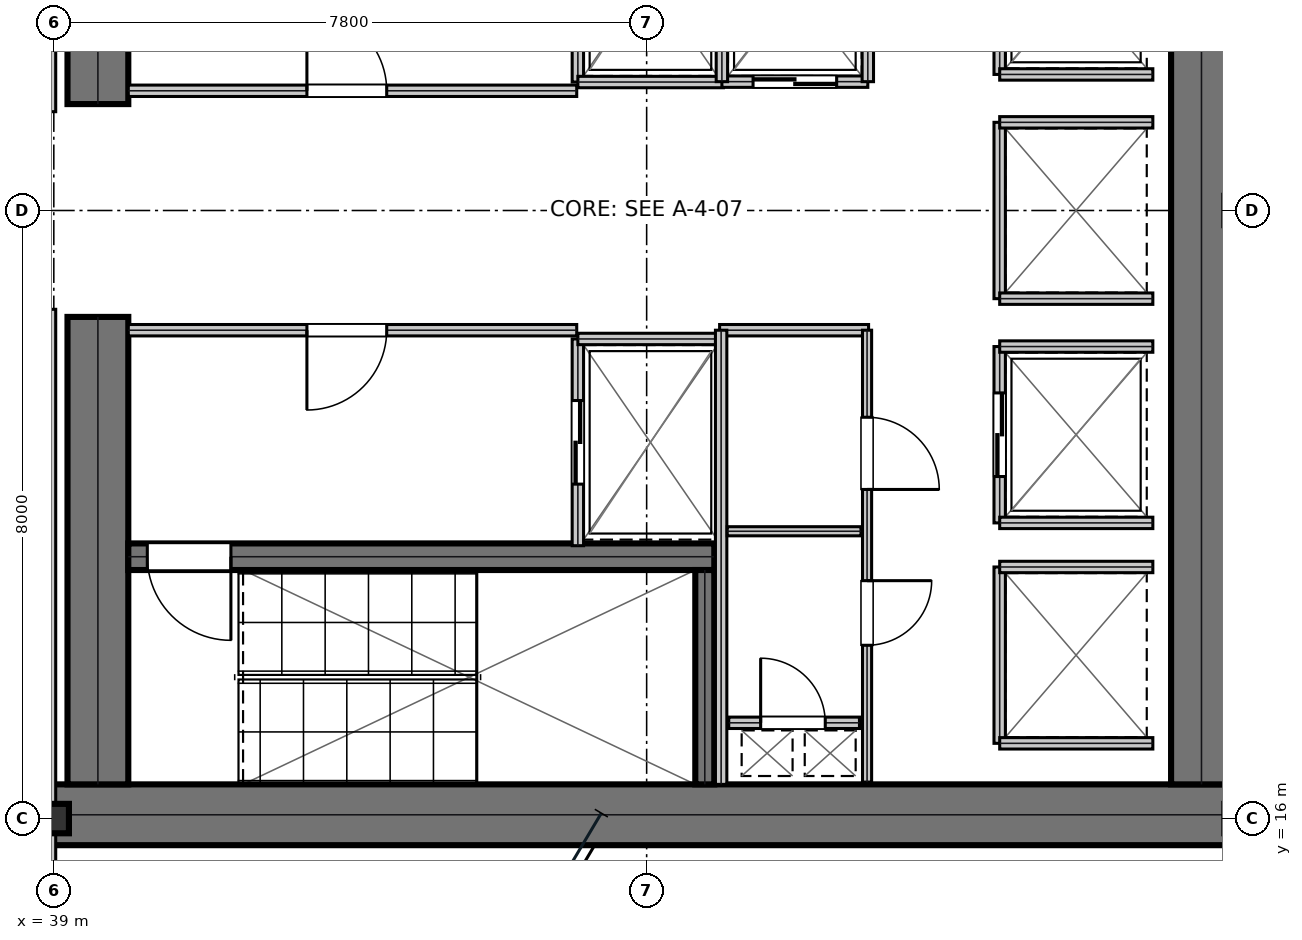
"""IFC4 building model, lengths in metres.
Left out: names, types, materials, properties, quantities, classifications, styles, units other than length and angle.
Written with IfcOpenShell. Run it as: python <this file> out.ifc"""

import sys

from ifc_helpers import new_model, si_unit, direction, frame, frame_2d, origin, origin_2d, place, context, subcontext, project, spatial, rectangle, i_section, extrude, element, fill, save


model = new_model("IFC4")
c1 = context("Model", 3, precision=1e-05, world=origin(), true_north=direction((0.0, 1.0)))
c2 = subcontext(c1, "Body", "Model", "MODEL_VIEW")
j1 = project(units=[si_unit("LENGTHUNIT", "METRE"), si_unit("PLANEANGLEUNIT", "RADIAN")], contexts=[c1])
p1 = place(None, origin())
s1 = spatial("IfcSite", under=j1, at=p1, CompositionType="ELEMENT")
p2 = place(p1, origin())
s2 = spatial("IfcBuilding", under=s1, at=p2, CompositionType="ELEMENT")
p3 = place(p2, frame((0.0, 0.0, 177.6)))
s3 = spatial("IfcBuildingStorey", under=s2, at=p3, CompositionType="ELEMENT", Elevation=177.6)
p4 = place(p3, frame((38.8, 16.05, 0.0), z_axis=(0.0, 0.0, 1.0), x_axis=(1.0, 0.0, 0.0)))
e1 = element("IfcWall", 1, at=p4, inside=s3, PredefinedType="SHEAR", context=c2, shape_type="SweptSolid", body=[
    extrude(rectangle(XDim=16.0, YDim=0.8, at=frame_2d((8.0, 0.0))), origin(), (0.0, 0.0, 1.0), 3.73),
])
for number, where, z_axis, x_axis in (
    (2, (39.58, 16.45, 0.0), (0.0, 0.0, 1.0), (0.0, 1.0, 0.0)),
    (3, (39.58, 25.4, 0.0), (0.0, 0.0, 1.0), (0.0, 1.0, 0.0)),
):
    element("IfcWall", number, at=place(p3, frame(where, z_axis=z_axis, x_axis=x_axis)), inside=s3, PredefinedType="SHEAR", context=c2, shape_type="SweptSolid", body=[
        extrude(rectangle(XDim=6.15, YDim=0.8, at=frame_2d((3.075, 0.0))), origin(), (0.0, 0.0, 1.0), 3.73),
    ])
p5 = place(p3, frame((54.1, 16.45, 0.0), z_axis=(0.0, 0.0, 1.0), x_axis=(0.0, 1.0, 0.0)))
e4 = element("IfcWall", 4, at=p5, inside=s3, PredefinedType="SHEAR", context=c2, shape_type="SweptSolid", body=[
    extrude(rectangle(XDim=15.1, YDim=0.8, at=frame_2d((7.55, 0.0))), origin(), (0.0, 0.0, 1.0), 3.73),
])
p6 = place(p3, frame((39.98, 19.445, 0.0), z_axis=(0.0, 0.0, 1.0), x_axis=(1.0, 0.0, 0.0)))
e5 = element("IfcWall", 5, at=p6, inside=s3, PredefinedType="SHEAR", context=c2, shape_type="SweptSolid", body=[
    extrude(rectangle(XDim=7.71, YDim=0.35, at=frame_2d((3.855, 0.0))), origin(), (0.0, 0.0, 1.0), 3.73),
])
p7 = place(p6, frame((0.25, 0.0, 0.0)))
e6 = element("IfcOpeningElement", 6, at=p7, cuts=e5, PredefinedType="OPENING", context=c2, shape_type="SweptSolid", body=[
    extrude(rectangle(XDim=1.1, YDim=2.15, at=frame_2d((0.55, 1.075))), frame((0.0, 0.185, 0.0), z_axis=(0.0, -1.0, 0.0), x_axis=(1.0, 0.0, 0.0)), (0.0, 0.0, 1.0), 0.37),
])
p8 = place(p3, frame((47.565, 16.45, 0.0), z_axis=(0.0, 0.0, 1.0), x_axis=(0.0, 1.0, 0.0)))
e7 = element("IfcWall", 7, at=p8, inside=s3, PredefinedType="SHEAR", context=c2, shape_type="SweptSolid", body=[
    extrude(rectangle(XDim=2.82, YDim=0.25, at=frame_2d((1.41, 0.0))), origin(), (0.0, 0.0, 1.0), 3.73),
])
p9 = place(p3, frame((39.0, 16.0, 0.0), z_axis=(0.0, 0.0, 1.0), x_axis=(1.0, 0.0, 0.0)))
e8 = element("IfcColumn", 8, at=p9, inside=s3, PredefinedType="COLUMN", context=c2, shape_type="SweptSolid", body=[
    extrude(i_section(OverallWidth=0.398, OverallDepth=0.387, WebThickness=0.021, FlangeThickness=0.033, at=origin_2d()), origin(), (0.0, 0.0, 1.0), 4.044),
])
p10 = place(p3, frame((39.98, 25.575, 0.0), z_axis=(0.0, 0.0, 1.0), x_axis=(1.0, 0.0, 0.0)))
e9 = element("IfcWall", 9, at=p10, inside=s3, PredefinedType="PARTITIONING", context=c2, shape_type="SweptSolid", body=[
    extrude(rectangle(XDim=5.9, YDim=0.15, at=frame_2d((2.95, 0.0))), origin(), (0.0, 0.0, 1.0), 3.73),
])
p11 = place(p10, frame((2.35, 0.0, 0.0)))
e10 = element("IfcOpeningElement", 10, at=p11, cuts=e9, PredefinedType="OPENING", context=c2, shape_type="SweptSolid", body=[
    extrude(rectangle(XDim=1.05, YDim=2.15, at=frame_2d((0.525, 1.075))), frame((0.0, 0.085, 0.0), z_axis=(0.0, -1.0, 0.0), x_axis=(1.0, 0.0, 0.0)), (0.0, 0.0, 1.0), 0.17),
])
p12 = place(p3, frame((39.98, 22.425, 0.0), z_axis=(0.0, 0.0, 1.0), x_axis=(1.0, 0.0, 0.0)))
e11 = element("IfcWall", 11, at=p12, inside=s3, PredefinedType="PARTITIONING", context=c2, shape_type="SweptSolid", body=[
    extrude(rectangle(XDim=5.9, YDim=0.15, at=frame_2d((2.95, 0.0))), origin(), (0.0, 0.0, 1.0), 3.73),
])
p13 = place(p12, frame((2.35, 0.0, 0.0)))
e12 = element("IfcOpeningElement", 12, at=p13, cuts=e11, PredefinedType="OPENING", context=c2, shape_type="SweptSolid", body=[
    extrude(rectangle(XDim=1.05, YDim=2.15, at=frame_2d((0.525, 1.075))), frame((0.0, 0.085, 0.0), z_axis=(0.0, -1.0, 0.0), x_axis=(1.0, 0.0, 0.0)), (0.0, 0.0, 1.0), 0.17),
])
p14 = place(p3, frame((45.895, 25.69, 0.0), z_axis=(0.0, 0.0, 1.0), x_axis=(0.0, 1.0, 0.0)))
e13 = element("IfcWall", 13, at=p14, inside=s3, PredefinedType="PARTITIONING", context=c2, shape_type="SweptSolid", body=[
    extrude(rectangle(XDim=2.72, YDim=0.15, at=frame_2d((1.36, 0.0))), origin(), (0.0, 0.0, 1.0), 3.73),
])
p15 = place(p14, frame((0.81, 0.0, 0.0)))
e14 = element("IfcOpeningElement", 14, at=p15, cuts=e13, PredefinedType="OPENING", context=c2, shape_type="SweptSolid", body=[
    extrude(rectangle(XDim=1.1, YDim=2.15, at=frame_2d((0.55, 1.075))), frame((0.0, 0.085, 0.0), z_axis=(0.0, -1.0, 0.0), x_axis=(1.0, 0.0, 0.0)), (0.0, 0.0, 1.0), 0.17),
])
p16 = place(p3, frame((45.895, 25.69, 0.0), z_axis=(0.0, 0.0, 1.0), x_axis=(1.0, 0.0, 0.0)))
e15 = element("IfcWall", 15, at=p16, inside=s3, PredefinedType="PARTITIONING", context=c2, shape_type="SweptSolid", body=[
    extrude(rectangle(XDim=1.915, YDim=0.15, at=frame_2d((0.958, 0.0))), origin(), (0.0, 0.0, 1.0), 3.73),
])
p17 = place(p3, frame((45.895, 19.59, 0.0), z_axis=(0.0, 0.0, 1.0), x_axis=(0.0, 1.0, 0.0)))
e16 = element("IfcWall", 16, at=p17, inside=s3, PredefinedType="PARTITIONING", context=c2, shape_type="SweptSolid", body=[
    extrude(rectangle(XDim=2.72, YDim=0.15, at=frame_2d((1.36, 0.0))), origin(), (0.0, 0.0, 1.0), 3.73),
])
p18 = place(p17, frame((0.81, 0.0, 0.0)))
e17 = element("IfcOpeningElement", 17, at=p18, cuts=e16, PredefinedType="OPENING", context=c2, shape_type="SweptSolid", body=[
    extrude(rectangle(XDim=1.1, YDim=2.15, at=frame_2d((0.55, 1.075))), frame((0.0, 0.085, 0.0), z_axis=(0.0, -1.0, 0.0), x_axis=(1.0, 0.0, 0.0)), (0.0, 0.0, 1.0), 0.17),
])
p19 = place(p3, frame((45.895, 22.31, 0.0), z_axis=(0.0, 0.0, 1.0), x_axis=(1.0, 0.0, 0.0)))
e18 = element("IfcWall", 18, at=p19, inside=s3, PredefinedType="PARTITIONING", context=c2, shape_type="SweptSolid", body=[
    extrude(rectangle(XDim=1.915, YDim=0.15, at=frame_2d((0.958, 0.0))), origin(), (0.0, 0.0, 1.0), 3.73),
])
p20 = place(p3, frame((47.79, 25.695, 0.0), z_axis=(0.0, 0.0, 1.0), x_axis=(1.0, 0.0, 0.0)))
e19 = element("IfcWall", 19, at=p20, inside=s3, PredefinedType="PARTITIONING", context=c2, shape_type="SweptSolid", body=[
    extrude(rectangle(XDim=1.92, YDim=0.15, at=frame_2d((0.96, 0.0))), origin(), (0.0, 0.0, 1.0), 3.73),
])
p21 = place(p20, frame((0.41, 0.0, 0.0)))
e20 = element("IfcOpeningElement", 20, at=p21, cuts=e19, PredefinedType="OPENING", context=c2, shape_type="SweptSolid", body=[
    extrude(rectangle(XDim=1.1, YDim=2.15, at=frame_2d((0.55, 1.075))), frame((0.0, 0.085, 0.0), z_axis=(0.0, -1.0, 0.0), x_axis=(1.0, 0.0, 0.0)), (0.0, 0.0, 1.0), 0.17),
])
for number, where, z_axis, x_axis in (
    (21, (47.79, 25.695, 0.0), (0.0, 0.0, 1.0), (0.0, 1.0, 0.0)),
    (22, (49.71, 25.695, 0.0), (0.0, 0.0, 1.0), (0.0, 1.0, 0.0)),
):
    element("IfcWall", number, at=place(p3, frame(where, z_axis=z_axis, x_axis=x_axis)), inside=s3, PredefinedType="PARTITIONING", context=c2, shape_type="SweptSolid", body=[
        extrude(rectangle(XDim=2.415, YDim=0.15, at=frame_2d((1.208, 0.0))), origin(), (0.0, 0.0, 1.0), 3.73),
    ])
p22 = place(p3, frame((51.445, 25.79, 0.0), z_axis=(0.0, 0.0, 1.0), x_axis=(0.0, 1.0, 0.0)))
e23 = element("IfcWall", 23, at=p22, inside=s3, PredefinedType="PARTITIONING", context=c2, shape_type="SweptSolid", body=[
    extrude(rectangle(XDim=2.32, YDim=0.15, at=frame_2d((1.16, 0.0))), origin(), (0.0, 0.0, 1.0), 3.73),
])
p23 = place(p22, frame((0.61, 0.0, 0.0)))
e24 = element("IfcOpeningElement", 24, at=p23, cuts=e23, PredefinedType="OPENING", context=c2, shape_type="SweptSolid", body=[
    extrude(rectangle(XDim=1.1, YDim=2.15, at=frame_2d((0.55, 1.075))), frame((0.0, 0.085, 0.0), z_axis=(0.0, -1.0, 0.0), x_axis=(1.0, 0.0, 0.0)), (0.0, 0.0, 1.0), 0.17),
])
p24 = place(p3, frame((51.445, 25.79, 0.0), z_axis=(0.0, 0.0, 1.0), x_axis=(1.0, 0.0, 0.0)))
e25 = element("IfcWall", 25, at=p24, inside=s3, PredefinedType="PARTITIONING", context=c2, shape_type="SweptSolid", body=[
    extrude(rectangle(XDim=2.015, YDim=0.15, at=frame_2d((1.007, 0.0))), origin(), (0.0, 0.0, 1.0), 3.73),
])
p25 = place(p3, frame((51.445, 19.89, 0.0), z_axis=(0.0, 0.0, 1.0), x_axis=(0.0, 1.0, 0.0)))
e26 = element("IfcWall", 26, at=p25, inside=s3, PredefinedType="PARTITIONING", context=c2, shape_type="SweptSolid", body=[
    extrude(rectangle(XDim=2.32, YDim=0.15, at=frame_2d((1.16, 0.0))), origin(), (0.0, 0.0, 1.0), 3.73),
])
p26 = place(p25, frame((0.61, 0.0, 0.0)))
e27 = element("IfcOpeningElement", 27, at=p26, cuts=e26, PredefinedType="OPENING", context=c2, shape_type="SweptSolid", body=[
    extrude(rectangle(XDim=1.1, YDim=2.15, at=frame_2d((0.55, 1.075))), frame((0.0, 0.085, 0.0), z_axis=(0.0, -1.0, 0.0), x_axis=(1.0, 0.0, 0.0)), (0.0, 0.0, 1.0), 0.17),
])
for number, where, z_axis, x_axis in (
    (28, (51.445, 19.89, 0.0), (0.0, 0.0, 1.0), (1.0, 0.0, 0.0)),
    (29, (51.445, 22.21, 0.0), (0.0, 0.0, 1.0), (1.0, 0.0, 0.0)),
):
    element("IfcWall", number, at=place(p3, frame(where, z_axis=z_axis, x_axis=x_axis)), inside=s3, PredefinedType="PARTITIONING", context=c2, shape_type="SweptSolid", body=[
        extrude(rectangle(XDim=2.015, YDim=0.15, at=frame_2d((1.007, 0.0))), origin(), (0.0, 0.0, 1.0), 3.73),
    ])
p27 = place(p3, frame((51.445, 22.84, 0.0), z_axis=(0.0, 0.0, 1.0), x_axis=(0.0, 1.0, 0.0)))
e30 = element("IfcWall", 30, at=p27, inside=s3, PredefinedType="PARTITIONING", context=c2, shape_type="SweptSolid", body=[
    extrude(rectangle(XDim=2.32, YDim=0.15, at=frame_2d((1.16, 0.0))), origin(), (0.0, 0.0, 1.0), 3.73),
])
for number, where, z_axis, x_axis in (
    (31, (51.445, 22.84, 0.0), (0.0, 0.0, 1.0), (1.0, 0.0, 0.0)),
    (32, (51.445, 25.16, 0.0), (0.0, 0.0, 1.0), (1.0, 0.0, 0.0)),
):
    element("IfcWall", number, at=place(p3, frame(where, z_axis=z_axis, x_axis=x_axis)), inside=s3, PredefinedType="PARTITIONING", context=c2, shape_type="SweptSolid", body=[
        extrude(rectangle(XDim=2.015, YDim=0.15, at=frame_2d((1.007, 0.0))), origin(), (0.0, 0.0, 1.0), 3.73),
    ])
p28 = place(p3, frame((51.445, 16.99, 0.0), z_axis=(0.0, 0.0, 1.0), x_axis=(0.0, 1.0, 0.0)))
e33 = element("IfcWall", 33, at=p28, inside=s3, PredefinedType="PARTITIONING", context=c2, shape_type="SweptSolid", body=[
    extrude(rectangle(XDim=2.32, YDim=0.15, at=frame_2d((1.16, 0.0))), origin(), (0.0, 0.0, 1.0), 3.73),
])
for number, where, z_axis, x_axis in (
    (34, (51.445, 16.99, 0.0), (0.0, 0.0, 1.0), (1.0, 0.0, 0.0)),
    (35, (51.445, 19.31, 0.0), (0.0, 0.0, 1.0), (1.0, 0.0, 0.0)),
):
    element("IfcWall", number, at=place(p3, frame(where, z_axis=z_axis, x_axis=x_axis)), inside=s3, PredefinedType="PARTITIONING", context=c2, shape_type="SweptSolid", body=[
        extrude(rectangle(XDim=2.015, YDim=0.15, at=frame_2d((1.007, 0.0))), origin(), (0.0, 0.0, 1.0), 3.73),
    ])
p29 = place(p3, frame((47.88, 17.26, 0.0), z_axis=(0.0, 0.0, 1.0), x_axis=(1.0, 0.0, 0.0)))
e36 = element("IfcWall", 36, at=p29, inside=s3, PredefinedType="PARTITIONING", context=c2, shape_type="SweptSolid", body=[
    extrude(rectangle(XDim=1.72, YDim=0.15, at=frame_2d((0.86, 0.0))), origin(), (0.0, 0.0, 1.0), 3.73),
])
p30 = place(p29, frame((0.42, 0.0, 0.0)))
e37 = element("IfcOpeningElement", 37, at=p30, cuts=e36, PredefinedType="OPENING", context=c2, shape_type="SweptSolid", body=[
    extrude(rectangle(XDim=0.85, YDim=2.15, at=frame_2d((0.425, 1.075))), frame((0.0, 0.085, 0.0), z_axis=(0.0, -1.0, 0.0), x_axis=(1.0, 0.0, 0.0)), (0.0, 0.0, 1.0), 0.17),
])
p31 = place(p3, frame((47.76, 22.425, 0.0), z_axis=(0.0, 0.0, 1.0), x_axis=(1.0, 0.0, 0.0)))
e38 = element("IfcWall", 38, at=p31, inside=s3, PredefinedType="PARTITIONING", context=c2, shape_type="SweptSolid", body=[
    extrude(rectangle(XDim=1.96, YDim=0.15, at=frame_2d((0.98, 0.0))), origin(), (0.0, 0.0, 1.0), 3.73),
])
p32 = place(p3, frame((47.78, 16.45, 0.0), z_axis=(0.0, 0.0, 1.0), x_axis=(0.0, 1.0, 0.0)))
e39 = element("IfcWall", 39, at=p32, inside=s3, PredefinedType="PARTITIONING", context=c2, shape_type="SweptSolid", body=[
    extrude(rectangle(XDim=5.975, YDim=0.15, at=frame_2d((2.988, 0.0))), origin(), (0.0, 0.0, 1.0), 3.73),
])
p33 = place(p3, frame((47.86, 19.78, 0.0), z_axis=(0.0, 0.0, 1.0), x_axis=(1.0, 0.0, 0.0)))
e40 = element("IfcWall", 40, at=p33, inside=s3, PredefinedType="PARTITIONING", context=c2, shape_type="SweptSolid", body=[
    extrude(rectangle(XDim=1.76, YDim=0.12, at=frame_2d((0.88, 0.0))), origin(), (0.0, 0.0, 1.0), 3.73),
])
p34 = place(p3, frame((49.7, 16.48, 0.0), z_axis=(0.0, 0.0, 1.0), x_axis=(0.0, 1.0, 0.0)))
e41 = element("IfcWall", 41, at=p34, inside=s3, PredefinedType="PARTITIONING", context=c2, shape_type="SweptSolid", body=[
    extrude(rectangle(XDim=5.945, YDim=0.12, at=frame_2d((2.973, 0.0))), origin(), (0.0, 0.0, 1.0), 3.73),
])
p35 = place(p34, frame((1.8, 0.0, 0.0)))
e42 = element("IfcOpeningElement", 42, at=p35, cuts=e41, PredefinedType="OPENING", context=c2, shape_type="SweptSolid", body=[
    extrude(rectangle(XDim=0.85, YDim=2.15, at=frame_2d((0.425, 1.075))), frame((0.0, 0.07, 0.0), z_axis=(0.0, -1.0, 0.0), x_axis=(1.0, 0.0, 0.0)), (0.0, 0.0, 1.0), 0.14),
])
p36 = place(p34, frame((3.85, 0.0, 0.0)))
e43 = element("IfcOpeningElement", 43, at=p36, cuts=e41, PredefinedType="OPENING", context=c2, shape_type="SweptSolid", body=[
    extrude(rectangle(XDim=0.95, YDim=2.15, at=frame_2d((0.475, 1.075))), frame((0.0, 0.07, 0.0), z_axis=(0.0, -1.0, 0.0), x_axis=(1.0, 0.0, 0.0)), (0.0, 0.0, 1.0), 0.14),
])
for number, where, z_axis, x_axis in (
    (44, (38.95, 14.5, 0.0), (0.0, 0.0, 1.0), (0.0, 1.0, 0.0)),
    (45, (38.95, 25.3, 0.0), (0.0, 0.0, 1.0), (0.0, 1.0, 0.0)),
):
    element("IfcWall", number, at=place(p3, frame(where, z_axis=z_axis, x_axis=x_axis)), inside=s3, PredefinedType="PARTITIONING", context=c2, shape_type="SweptSolid", body=[
        extrude(rectangle(XDim=8.2, YDim=0.15, at=frame_2d((4.1, 0.0))), origin(), (0.0, 0.0, 1.0), 3.11),
    ])
p37 = place(p11, origin())
e46 = element("IfcDoor", 46, at=p37, inside=s3, OperationType="SINGLE_SWING_LEFT", PredefinedType="DOOR", context=c2, shape_type="SweptSolid", body=[
    extrude(rectangle(XDim=1.05, YDim=2.15, at=frame_2d((0.525, 1.075))), frame((0.0, 0.025, 0.0), z_axis=(0.0, -1.0, 0.0), x_axis=(1.0, 0.0, 0.0)), (0.0, 0.0, 1.0), 0.05),
])
fill(e10, e46)
p38 = place(p13, frame((1.05, 0.0, 0.0), z_axis=(0.0, 0.0, 1.0), x_axis=(-1.0, 0.0, 0.0)))
e47 = element("IfcDoor", 47, at=p38, inside=s3, OperationType="SINGLE_SWING_RIGHT", PredefinedType="DOOR", context=c2, shape_type="SweptSolid", body=[
    extrude(rectangle(XDim=1.05, YDim=2.15, at=frame_2d((0.525, 1.075))), frame((0.0, 0.025, 0.0), z_axis=(0.0, -1.0, 0.0), x_axis=(1.0, 0.0, 0.0)), (0.0, 0.0, 1.0), 0.05),
])
fill(e12, e47)
p39 = place(p18, frame((1.1, 0.0, 0.0), z_axis=(0.0, 0.0, 1.0), x_axis=(-1.0, 0.0, 0.0)))
e48 = element("IfcDoor", 48, at=p39, inside=s3, OperationType="DOUBLE_DOOR_SLIDING", PredefinedType="DOOR", context=c2, shape_type="SweptSolid", body=[
    extrude(rectangle(XDim=1.1, YDim=2.15, at=frame_2d((0.55, 1.075))), frame((0.0, 0.025, 0.0), z_axis=(0.0, -1.0, 0.0), x_axis=(1.0, 0.0, 0.0)), (0.0, 0.0, 1.0), 0.05),
])
fill(e17, e48)
p40 = place(p21, frame((1.1, 0.0, 0.0), z_axis=(0.0, 0.0, 1.0), x_axis=(-1.0, 0.0, 0.0)))
e49 = element("IfcDoor", 49, at=p40, inside=s3, OperationType="DOUBLE_DOOR_SLIDING", PredefinedType="DOOR", context=c2, shape_type="SweptSolid", body=[
    extrude(rectangle(XDim=1.1, YDim=2.15, at=frame_2d((0.55, 1.075))), frame((0.0, 0.025, 0.0), z_axis=(0.0, -1.0, 0.0), x_axis=(1.0, 0.0, 0.0)), (0.0, 0.0, 1.0), 0.05),
])
fill(e20, e49)
p41 = place(p26, frame((1.1, 0.0, 0.0), z_axis=(0.0, 0.0, 1.0), x_axis=(-1.0, 0.0, 0.0)))
e50 = element("IfcDoor", 50, at=p41, inside=s3, OperationType="DOUBLE_DOOR_SLIDING", PredefinedType="DOOR", context=c2, shape_type="SweptSolid", body=[
    extrude(rectangle(XDim=1.1, YDim=2.15, at=frame_2d((0.55, 1.075))), frame((0.0, 0.025, 0.0), z_axis=(0.0, -1.0, 0.0), x_axis=(1.0, 0.0, 0.0)), (0.0, 0.0, 1.0), 0.05),
])
fill(e27, e50)
p42 = place(p30, origin())
e51 = element("IfcDoor", 51, at=p42, inside=s3, OperationType="SINGLE_SWING_LEFT", PredefinedType="TRAPDOOR", context=c2, shape_type="SweptSolid", body=[
    extrude(rectangle(XDim=0.85, YDim=2.15, at=frame_2d((0.425, 1.075))), frame((0.0, 0.025, 0.0), z_axis=(0.0, -1.0, 0.0), x_axis=(1.0, 0.0, 0.0)), (0.0, 0.0, 1.0), 0.05),
])
fill(e37, e51)
p43 = place(p35, frame((0.85, 0.0, 0.0), z_axis=(0.0, 0.0, 1.0), x_axis=(-1.0, 0.0, 0.0)))
e52 = element("IfcDoor", 52, at=p43, inside=s3, OperationType="SINGLE_SWING_LEFT", PredefinedType="DOOR", context=c2, shape_type="SweptSolid", body=[
    extrude(rectangle(XDim=0.85, YDim=2.15, at=frame_2d((0.425, 1.075))), frame((0.0, 0.025, 0.0), z_axis=(0.0, -1.0, 0.0), x_axis=(1.0, 0.0, 0.0)), (0.0, 0.0, 1.0), 0.05),
])
fill(e42, e52)
p44 = place(p36, frame((0.95, 0.0, 0.0), z_axis=(0.0, 0.0, 1.0), x_axis=(-1.0, 0.0, 0.0)))
e53 = element("IfcDoor", 53, at=p44, inside=s3, OperationType="SINGLE_SWING_RIGHT", PredefinedType="DOOR", context=c2, shape_type="SweptSolid", body=[
    extrude(rectangle(XDim=0.95, YDim=2.15, at=frame_2d((0.475, 1.075))), frame((0.0, 0.025, 0.0), z_axis=(0.0, -1.0, 0.0), x_axis=(1.0, 0.0, 0.0)), (0.0, 0.0, 1.0), 0.05),
])
fill(e43, e53)
p45 = place(p7, frame((1.1, 0.0, 0.0), z_axis=(0.0, 0.0, 1.0), x_axis=(-1.0, 0.0, 0.0)))
e54 = element("IfcDoor", 54, at=p45, inside=s3, OperationType="SINGLE_SWING_LEFT", PredefinedType="DOOR", context=c2, shape_type="SweptSolid", body=[
    extrude(rectangle(XDim=1.1, YDim=2.15, at=frame_2d((0.55, 1.075))), frame((0.0, 0.025, 0.0), z_axis=(0.0, -1.0, 0.0), x_axis=(1.0, 0.0, 0.0)), (0.0, 0.0, 1.0), 0.05),
])
fill(e6, e54)
save(model, sys.argv[1])
